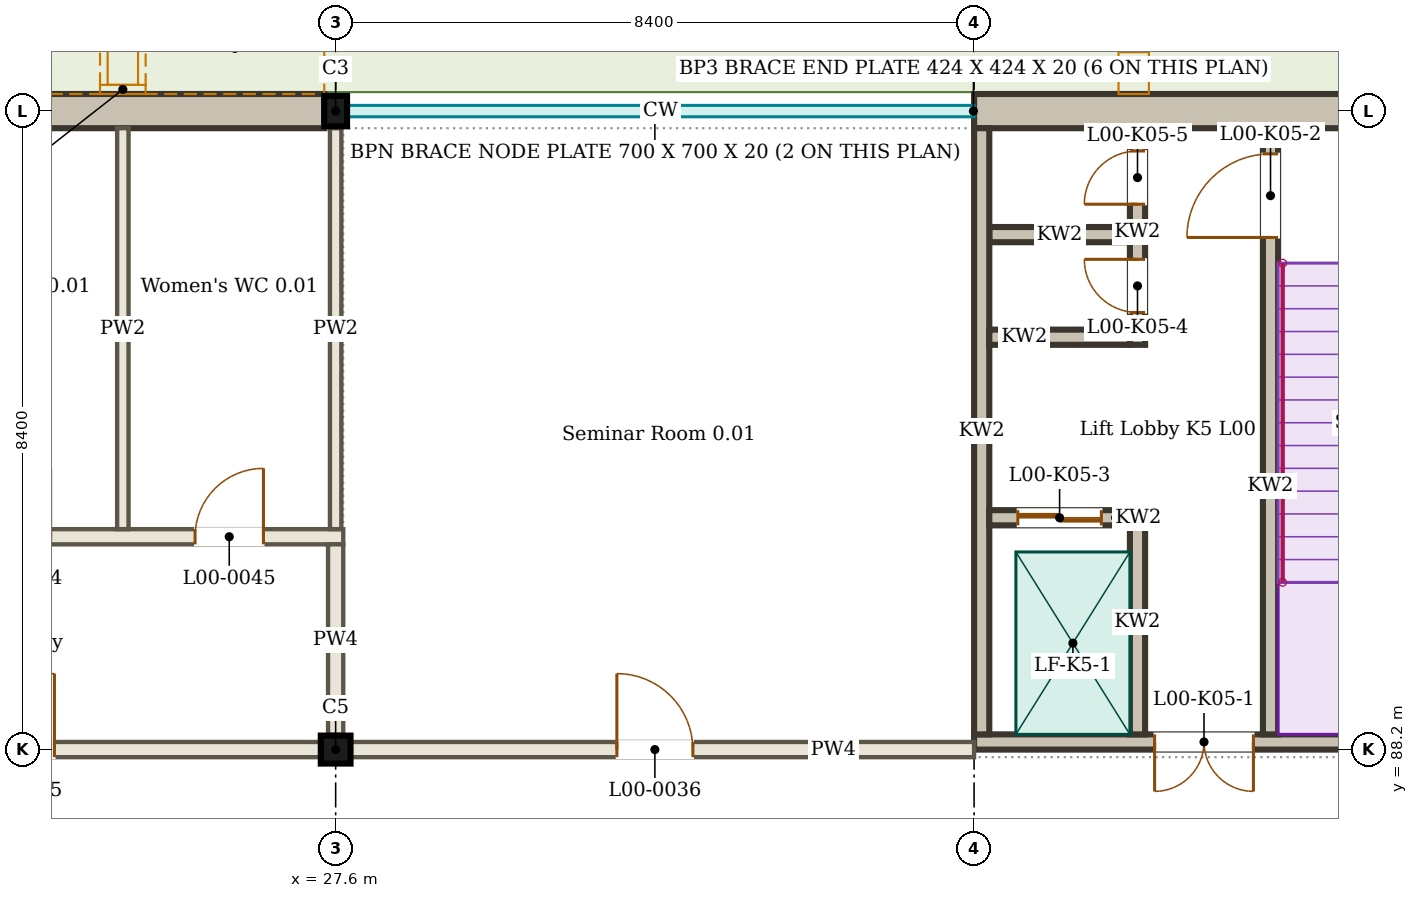
"""IFC4 building model, lengths in metres.
Left out: names, types, materials, properties, quantities, classifications, styles, units other than length and angle.
Written with IfcOpenShell. Run it as: python <this file> out.ifc"""

import sys

from ifc_helpers import new_model, si_unit, direction, frame, frame_2d, origin, origin_2d, place, context, subcontext, project, spatial, rectangle, i_section, extrude, element, fill, save


model = new_model("IFC4")
c1 = context("Model", 3, precision=1e-05, world=origin(), true_north=direction((0.0, 1.0)))
c2 = subcontext(c1, "Body", "Model", "MODEL_VIEW")
j1 = project(units=[si_unit("LENGTHUNIT", "METRE"), si_unit("PLANEANGLEUNIT", "RADIAN")], contexts=[c1])
p1 = place(None, origin())
s1 = spatial("IfcSite", under=j1, at=p1, CompositionType="ELEMENT")
p2 = place(p1, origin())
s2 = spatial("IfcBuilding", under=s1, at=p2, CompositionType="ELEMENT")
p3 = place(p2, origin())
s3 = spatial("IfcBuildingStorey", under=s2, at=p3, CompositionType="ELEMENT", Elevation=0.0)
p4 = place(p3, frame((27.6, 88.2, 0.0), z_axis=(0.0, 0.0, 1.0), x_axis=(1.0, 0.0, 0.0)))
e1 = element("IfcColumn", 1, at=p4, inside=s3, PredefinedType="COLUMN", context=c2, shape_type="SweptSolid", body=[
    extrude(i_section(OverallWidth=0.391, OverallDepth=0.368, WebThickness=0.015, FlangeThickness=0.024, FilletRadius=0.027, at=origin_2d()), origin(), (0.0, 0.0, 1.0), 4.5),
])
p5 = place(p3, frame((27.6, 96.6, 0.0), z_axis=(0.0, 0.0, 1.0), x_axis=(1.0, 0.0, 0.0)))
e2 = element("IfcColumn", 2, at=p5, inside=s3, PredefinedType="COLUMN", context=c2, shape_type="SweptSolid", body=[
    extrude(i_section(OverallWidth=0.3, OverallDepth=0.4, WebThickness=0.013, FlangeThickness=0.024, FilletRadius=0.027, at=origin_2d()), origin(), (0.0, 0.0, 1.0), 4.5),
])
p6 = place(p3, frame((19.2, 96.6, 0.0), z_axis=(0.0, 0.0, 1.0), x_axis=(1.0, 0.0, 0.0)))
e3 = element("IfcWall", 3, at=p6, inside=s3, PredefinedType="SOLIDWALL", context=c2, shape_type="SweptSolid", body=[
    extrude(rectangle(XDim=8.25, YDim=0.45, at=frame_2d((4.125, 0.0))), origin(), (0.0, 0.0, 1.0), 3.85),
])
p7 = place(p3, frame((19.2, 96.76, 3.87), z_axis=(0.0, 0.0, 1.0), x_axis=(1.0, 0.0, 0.0)))
e4 = element("IfcWall", 4, at=p7, inside=s3, PredefinedType="SOLIDWALL", context=c2, shape_type="SweptSolid", body=[
    extrude(rectangle(XDim=8.4, YDim=0.13, at=frame_2d((4.2, 0.0))), origin(), (0.0, 0.0, 1.0), 0.63),
])
p8 = place(p3, frame((19.2, 88.2, 0.0), z_axis=(0.0, 0.0, 1.0), x_axis=(1.0, 0.0, 0.0)))
e5 = element("IfcWall", 5, at=p8, inside=s3, PredefinedType="PARTITIONING", context=c2, shape_type="SweptSolid", body=[
    extrude(rectangle(XDim=8.205, YDim=0.2, at=frame_2d((4.102, 0.0))), origin(), (0.0, 0.0, 1.0), 3.8),
])
p9 = place(p8, frame((3.7, 0.0, 0.0)))
e6 = element("IfcOpeningElement", 6, at=p9, cuts=e5, PredefinedType="OPENING", context=c2, shape_type="SweptSolid", body=[
    extrude(rectangle(XDim=1.0, YDim=2.1, at=frame_2d((0.5, 1.05))), frame((0.0, 0.11, 0.0), z_axis=(0.0, -1.0, 0.0), x_axis=(1.0, 0.0, 0.0)), (0.0, 0.0, 1.0), 0.22),
])
p10 = place(p3, frame((27.795, 88.2, 0.0), z_axis=(0.0, 0.0, 1.0), x_axis=(1.0, 0.0, 0.0)))
e7 = element("IfcWall", 7, at=p10, inside=s3, PredefinedType="PARTITIONING", context=c2, shape_type="SweptSolid", body=[
    extrude(rectangle(XDim=8.205, YDim=0.2, at=frame_2d((4.102, 0.0))), origin(), (0.0, 0.0, 1.0), 3.8),
])
p11 = place(p10, frame((3.504, 0.0, 0.0)))
e8 = element("IfcOpeningElement", 8, at=p11, cuts=e7, PredefinedType="OPENING", context=c2, shape_type="SweptSolid", body=[
    extrude(rectangle(XDim=1.0, YDim=2.1, at=frame_2d((0.5, 1.05))), frame((0.0, 0.11, 0.0), z_axis=(0.0, -1.0, 0.0), x_axis=(1.0, 0.0, 0.0)), (0.0, 0.0, 1.0), 0.22),
])
p12 = place(p3, frame((19.2, 91.0, 0.0), z_axis=(0.0, 0.0, 1.0), x_axis=(1.0, 0.0, 0.0)))
e9 = element("IfcWall", 9, at=p12, inside=s3, PredefinedType="PARTITIONING", context=c2, shape_type="SweptSolid", body=[
    extrude(rectangle(XDim=8.5, YDim=0.2, at=frame_2d((4.25, 0.0))), origin(), (0.0, 0.0, 1.0), 3.8),
])
p13 = place(p12, frame((0.8, 0.0, 0.0)))
e10 = element("IfcOpeningElement", 10, at=p13, cuts=e9, PredefinedType="OPENING", context=c2, shape_type="SweptSolid", body=[
    extrude(rectangle(XDim=1.0, YDim=2.1, at=frame_2d((0.5, 1.05))), frame((0.0, 0.11, 0.0), z_axis=(0.0, -1.0, 0.0), x_axis=(1.0, 0.0, 0.0)), (0.0, 0.0, 1.0), 0.22),
])
p14 = place(p12, frame((3.75, 0.0, 0.0)))
e11 = element("IfcOpeningElement", 11, at=p14, cuts=e9, PredefinedType="OPENING", context=c2, shape_type="SweptSolid", body=[
    extrude(rectangle(XDim=0.9, YDim=2.1, at=frame_2d((0.45, 1.05))), frame((0.0, 0.11, 0.0), z_axis=(0.0, -1.0, 0.0), x_axis=(1.0, 0.0, 0.0)), (0.0, 0.0, 1.0), 0.22),
])
p15 = place(p12, frame((6.55, 0.0, 0.0)))
e12 = element("IfcOpeningElement", 12, at=p15, cuts=e9, PredefinedType="OPENING", context=c2, shape_type="SweptSolid", body=[
    extrude(rectangle(XDim=0.9, YDim=2.1, at=frame_2d((0.45, 1.05))), frame((0.0, 0.11, 0.0), z_axis=(0.0, -1.0, 0.0), x_axis=(1.0, 0.0, 0.0)), (0.0, 0.0, 1.0), 0.22),
])
p16 = place(p3, frame((24.8, 91.1, 0.0), z_axis=(0.0, 0.0, 1.0), x_axis=(0.0, 1.0, 0.0)))
e13 = element("IfcWall", 13, at=p16, inside=s3, PredefinedType="PARTITIONING", context=c2, shape_type="SweptSolid", body=[
    extrude(rectangle(XDim=5.275, YDim=0.15, at=frame_2d((2.637, 0.0))), origin(), (0.0, 0.0, 1.0), 3.95),
])
p17 = place(p3, frame((27.6, 88.396, 0.0), z_axis=(0.0, 0.0, 1.0), x_axis=(0.0, 1.0, 0.0)))
e14 = element("IfcWall", 14, at=p17, inside=s3, PredefinedType="PARTITIONING", context=c2, shape_type="SweptSolid", body=[
    extrude(rectangle(XDim=2.504, YDim=0.2, at=frame_2d((1.252, 0.0))), origin(), (0.0, 0.0, 1.0), 3.8),
])
p18 = place(p3, frame((27.6, 91.1, 0.0), z_axis=(0.0, 0.0, 1.0), x_axis=(0.0, 1.0, 0.0)))
e15 = element("IfcWall", 15, at=p18, inside=s3, PredefinedType="PARTITIONING", context=c2, shape_type="SweptSolid", body=[
    extrude(rectangle(XDim=5.275, YDim=0.15, at=frame_2d((2.637, 0.0))), origin(), (0.0, 0.0, 1.0), 3.8),
])
p19 = place(p3, frame((44.4, 88.3, 0.0), z_axis=(0.0, 0.0, 1.0), x_axis=(-1.0, 0.0, 0.0)))
e16 = element("IfcWall", 16, at=p19, inside=s3, PredefinedType="SOLIDWALL", context=c2, shape_type="SweptSolid", body=[
    extrude(rectangle(XDim=8.4, YDim=0.2, at=frame_2d((4.2, 0.0))), origin(), (0.0, 0.0, 1.0), 4.5),
])
p20 = place(p19, frame((4.725, 0.0, 0.0)))
e17 = element("IfcOpeningElement", 17, at=p20, cuts=e16, PredefinedType="OPENING", context=c2, shape_type="SweptSolid", body=[
    extrude(rectangle(XDim=1.3, YDim=2.1, at=frame_2d((0.65, 1.05))), frame((0.0, 0.11, 0.0), z_axis=(0.0, -1.0, 0.0), x_axis=(1.0, 0.0, 0.0)), (0.0, 0.0, 1.0), 0.22),
])
p21 = place(p3, frame((44.4, 96.6, 0.0), z_axis=(0.0, 0.0, 1.0), x_axis=(-1.0, 0.0, 0.0)))
e18 = element("IfcWall", 18, at=p21, inside=s3, PredefinedType="SOLIDWALL", context=c2, shape_type="SweptSolid", body=[
    extrude(rectangle(XDim=8.4, YDim=0.45, at=frame_2d((4.2, 0.0))), origin(), (0.0, 0.0, 1.0), 4.5),
])
p22 = place(p21, frame((1.65, 0.0, 0.0)))
e19 = element("IfcOpeningElement", 19, at=p22, cuts=e18, PredefinedType="OPENING", context=c2, shape_type="SweptSolid", body=[
    extrude(rectangle(XDim=1.3, YDim=2.1, at=frame_2d((0.65, 1.05))), frame((0.0, 0.235, 0.0), z_axis=(0.0, -1.0, 0.0), x_axis=(1.0, 0.0, 0.0)), (0.0, 0.0, 1.0), 0.47),
])
p23 = place(p3, frame((36.1, 88.4, 0.0), z_axis=(0.0, 0.0, 1.0), x_axis=(0.0, 1.0, 0.0)))
e20 = element("IfcWall", 20, at=p23, inside=s3, PredefinedType="SOLIDWALL", context=c2, shape_type="SweptSolid", body=[
    extrude(rectangle(XDim=7.975, YDim=0.2, at=frame_2d((3.988, 0.0))), origin(), (0.0, 0.0, 1.0), 4.5),
])
p24 = place(p3, frame((39.9, 88.4, 0.0), z_axis=(0.0, 0.0, 1.0), x_axis=(0.0, 1.0, 0.0)))
e21 = element("IfcWall", 21, at=p24, inside=s3, PredefinedType="SOLIDWALL", context=c2, shape_type="SweptSolid", body=[
    extrude(rectangle(XDim=7.975, YDim=0.2, at=frame_2d((3.988, 0.0))), origin(), (0.0, 0.0, 1.0), 4.5),
])
p25 = place(p24, frame((6.538, 0.0, 0.0)))
e22 = element("IfcOpeningElement", 22, at=p25, cuts=e21, PredefinedType="OPENING", context=c2, shape_type="SweptSolid", body=[
    extrude(rectangle(XDim=1.1, YDim=2.1, at=frame_2d((0.55, 1.05))), frame((0.0, 0.11, 0.0), z_axis=(0.0, -1.0, 0.0), x_axis=(1.0, 0.0, 0.0)), (0.0, 0.0, 1.0), 0.22),
])
p26 = place(p3, frame((38.15, 88.4, 0.0), z_axis=(0.0, 0.0, 1.0), x_axis=(0.0, 1.0, 0.0)))
e23 = element("IfcWall", 23, at=p26, inside=s3, PredefinedType="SOLIDWALL", context=c2, shape_type="SweptSolid", body=[
    extrude(rectangle(XDim=2.95, YDim=0.2, at=frame_2d((1.475, 0.0))), origin(), (0.0, 0.0, 1.0), 4.5),
])
p27 = place(p3, frame((38.15, 93.525, 0.0), z_axis=(0.0, 0.0, 1.0), x_axis=(0.0, 1.0, 0.0)))
e24 = element("IfcWall", 24, at=p27, inside=s3, PredefinedType="SOLIDWALL", context=c2, shape_type="SweptSolid", body=[
    extrude(rectangle(XDim=2.85, YDim=0.2, at=frame_2d((1.425, 0.0))), origin(), (0.0, 0.0, 1.0), 4.35),
])
p28 = place(p27, frame((0.425, 0.0, 0.0)))
e25 = element("IfcOpeningElement", 25, at=p28, cuts=e24, PredefinedType="OPENING", context=c2, shape_type="SweptSolid", body=[
    extrude(rectangle(XDim=0.7, YDim=2.1, at=frame_2d((0.35, 1.05))), frame((0.0, 0.11, 0.0), z_axis=(0.0, -1.0, 0.0), x_axis=(1.0, 0.0, 0.0)), (0.0, 0.0, 1.0), 0.22),
])
p29 = place(p27, frame((1.85, 0.0, 0.0)))
e26 = element("IfcOpeningElement", 26, at=p29, cuts=e24, PredefinedType="OPENING", context=c2, shape_type="SweptSolid", body=[
    extrude(rectangle(XDim=0.7, YDim=2.1, at=frame_2d((0.35, 1.05))), frame((0.0, 0.11, 0.0), z_axis=(0.0, -1.0, 0.0), x_axis=(1.0, 0.0, 0.0)), (0.0, 0.0, 1.0), 0.22),
])
p30 = place(p3, frame((38.05, 91.25, 0.0), z_axis=(0.0, 0.0, 1.0), x_axis=(-1.0, 0.0, 0.0)))
e27 = element("IfcWall", 27, at=p30, inside=s3, PredefinedType="SOLIDWALL", context=c2, shape_type="SweptSolid", body=[
    extrude(rectangle(XDim=1.85, YDim=0.2, at=frame_2d((0.925, 0.0))), origin(), (0.0, 0.0, 1.0), 4.5),
])
p31 = place(p30, frame((0.375, 0.0, 0.0)))
e28 = element("IfcOpeningElement", 28, at=p31, cuts=e27, PredefinedType="OPENING", context=c2, shape_type="SweptSolid", body=[
    extrude(rectangle(XDim=1.1, YDim=2.1, at=frame_2d((0.55, 1.05))), frame((0.0, 0.11, 0.0), z_axis=(0.0, -1.0, 0.0), x_axis=(1.0, 0.0, 0.0)), (0.0, 0.0, 1.0), 0.22),
])
for number, where, z_axis, x_axis in (
    (29, (38.05, 93.625, 0.0), (0.0, 0.0, 1.0), (-1.0, 0.0, 0.0)),
    (30, (38.05, 94.975, 0.0), (0.0, 0.0, 1.0), (-1.0, 0.0, 0.0)),
):
    element("IfcWall", number, at=place(p3, frame(where, z_axis=z_axis, x_axis=x_axis)), inside=s3, PredefinedType="SOLIDWALL", context=c2, shape_type="SweptSolid", body=[
        extrude(rectangle(XDim=1.85, YDim=0.2, at=frame_2d((0.925, 0.0))), origin(), (0.0, 0.0, 1.0), 4.35),
    ])
p32 = place(p9, origin())
e31 = element("IfcDoor", 31, at=p32, inside=s3, OperationType="SINGLE_SWING_RIGHT", PredefinedType="DOOR", context=c2, shape_type="SweptSolid", body=[
    extrude(rectangle(XDim=1.0, YDim=2.1, at=frame_2d((0.5, 1.05))), frame((0.0, 0.025, 0.0), z_axis=(0.0, -1.0, 0.0), x_axis=(1.0, 0.0, 0.0)), (0.0, 0.0, 1.0), 0.05),
])
fill(e6, e31)
p33 = place(p11, origin())
e32 = element("IfcDoor", 32, at=p33, inside=s3, OperationType="SINGLE_SWING_LEFT", PredefinedType="DOOR", context=c2, shape_type="SweptSolid", body=[
    extrude(rectangle(XDim=1.0, YDim=2.1, at=frame_2d((0.5, 1.05))), frame((0.0, 0.025, 0.0), z_axis=(0.0, -1.0, 0.0), x_axis=(1.0, 0.0, 0.0)), (0.0, 0.0, 1.0), 0.05),
])
fill(e8, e32)
p34 = place(p15, origin())
e33 = element("IfcDoor", 33, at=p34, inside=s3, OperationType="SINGLE_SWING_RIGHT", PredefinedType="DOOR", context=c2, shape_type="SweptSolid", body=[
    extrude(rectangle(XDim=0.9, YDim=2.1, at=frame_2d((0.45, 1.05))), frame((0.0, 0.025, 0.0), z_axis=(0.0, -1.0, 0.0), x_axis=(1.0, 0.0, 0.0)), (0.0, 0.0, 1.0), 0.05),
])
fill(e12, e33)
p35 = place(p20, origin())
e34 = element("IfcDoor", 34, at=p35, inside=s3, OperationType="DOUBLE_DOOR_DOUBLE_SWING", PredefinedType="DOOR", context=c2, shape_type="SweptSolid", body=[
    extrude(rectangle(XDim=1.3, YDim=2.1, at=frame_2d((0.65, 1.05))), frame((0.0, 0.025, 0.0), z_axis=(0.0, -1.0, 0.0), x_axis=(1.0, 0.0, 0.0)), (0.0, 0.0, 1.0), 0.05),
])
fill(e17, e34)
p36 = place(p25, origin())
e35 = element("IfcDoor", 35, at=p36, inside=s3, OperationType="SINGLE_SWING_LEFT", PredefinedType="DOOR", context=c2, shape_type="SweptSolid", body=[
    extrude(rectangle(XDim=1.1, YDim=2.1, at=frame_2d((0.55, 1.05))), frame((0.0, 0.025, 0.0), z_axis=(0.0, -1.0, 0.0), x_axis=(1.0, 0.0, 0.0)), (0.0, 0.0, 1.0), 0.05),
])
fill(e22, e35)
p37 = place(p31, origin())
e36 = element("IfcDoor", 36, at=p37, inside=s3, OperationType="DOUBLE_DOOR_SLIDING", PredefinedType="DOOR", context=c2, shape_type="SweptSolid", body=[
    extrude(rectangle(XDim=1.1, YDim=2.1, at=frame_2d((0.55, 1.05))), frame((0.0, 0.025, 0.0), z_axis=(0.0, -1.0, 0.0), x_axis=(1.0, 0.0, 0.0)), (0.0, 0.0, 1.0), 0.05),
])
fill(e28, e36)
p38 = place(p28, origin())
e37 = element("IfcDoor", 37, at=p38, inside=s3, OperationType="SINGLE_SWING_RIGHT", PredefinedType="DOOR", context=c2, shape_type="SweptSolid", body=[
    extrude(rectangle(XDim=0.7, YDim=2.1, at=frame_2d((0.35, 1.05))), frame((0.0, 0.025, 0.0), z_axis=(0.0, -1.0, 0.0), x_axis=(1.0, 0.0, 0.0)), (0.0, 0.0, 1.0), 0.05),
])
fill(e25, e37)
p39 = place(p29, origin())
e38 = element("IfcDoor", 38, at=p39, inside=s3, OperationType="SINGLE_SWING_LEFT", PredefinedType="DOOR", context=c2, shape_type="SweptSolid", body=[
    extrude(rectangle(XDim=0.7, YDim=2.1, at=frame_2d((0.35, 1.05))), frame((0.0, 0.025, 0.0), z_axis=(0.0, -1.0, 0.0), x_axis=(1.0, 0.0, 0.0)), (0.0, 0.0, 1.0), 0.05),
])
fill(e26, e38)
save(model, sys.argv[1])
